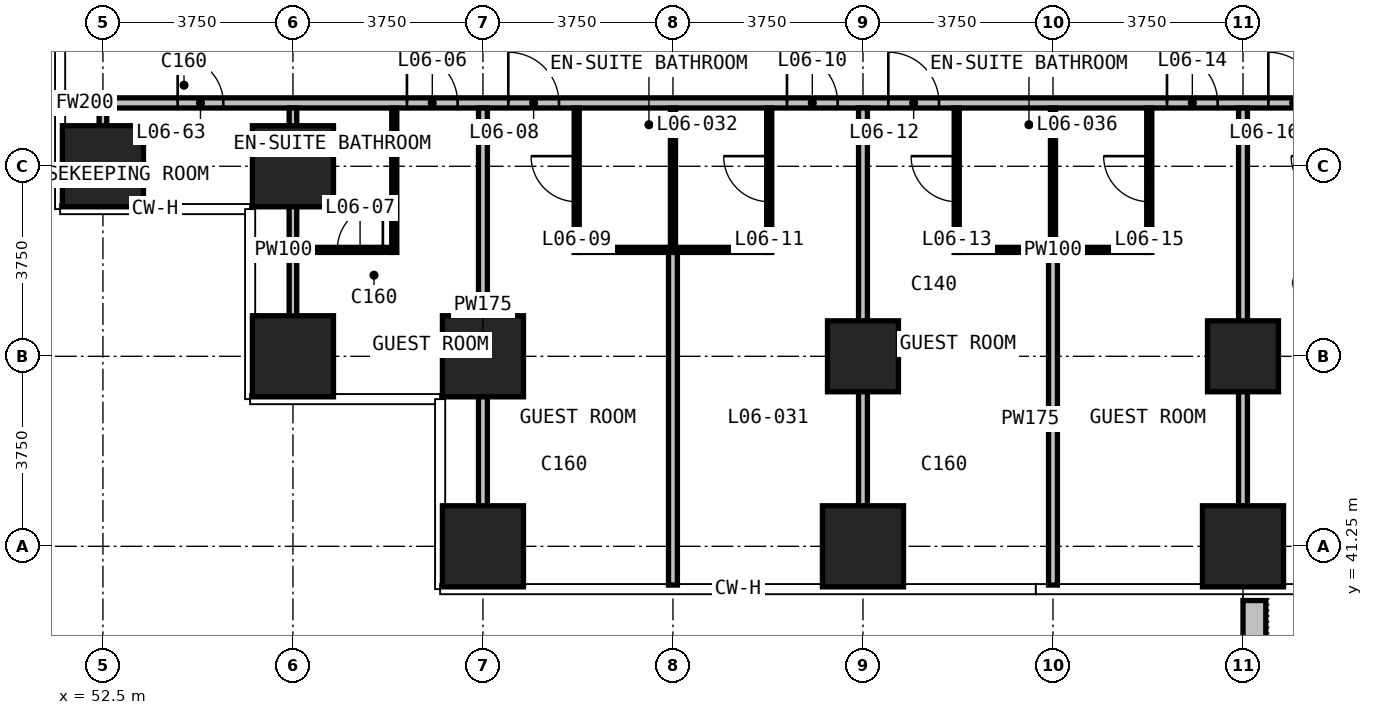
"""IFC4 building model, lengths in metres.
Left out: names, types, materials, properties, quantities, classifications, styles, units other than length and angle.
Written with IfcOpenShell. Run it as: python <this file> out.ifc"""

import sys

from ifc_helpers import new_model, si_unit, direction, frame, frame_2d, origin, origin_2d, place, context, subcontext, project, spatial, rectangle, extrude, element, fill, save


model = new_model("IFC4")
c1 = context("Model", 3, precision=1e-05, world=origin(), true_north=direction((0.0, 1.0)))
c2 = subcontext(c1, "Body", "Model", "MODEL_VIEW")
j1 = project(units=[si_unit("LENGTHUNIT", "METRE"), si_unit("PLANEANGLEUNIT", "RADIAN")], contexts=[c1])
p1 = place(None, origin())
s1 = spatial("IfcSite", under=j1, at=p1, CompositionType="ELEMENT")
p2 = place(p1, origin())
s2 = spatial("IfcBuilding", under=s1, at=p2, CompositionType="ELEMENT")
p3 = place(p2, frame((0.0, 0.0, 39.5)))
s3 = spatial("IfcBuildingStorey", under=s2, at=p3, CompositionType="ELEMENT", Elevation=39.5)
for number, where, z_axis, x_axis in (
    (1, (52.5, 48.75, 0.0), (0.0, 0.0, 1.0), (1.0, 0.0, 0.0)),
    (2, (56.25, 45.0, 0.0), (0.0, 0.0, 1.0), (1.0, 0.0, 0.0)),
    (3, (56.25, 48.75, 0.0), (0.0, 0.0, 1.0), (1.0, 0.0, 0.0)),
    (4, (60.0, 41.25, 0.0), (0.0, 0.0, 1.0), (1.0, 0.0, 0.0)),
    (5, (60.0, 45.0, 0.0), (0.0, 0.0, 1.0), (1.0, 0.0, 0.0)),
    (6, (67.5, 41.25, 0.0), (0.0, 0.0, 1.0), (1.0, 0.0, 0.0)),
):
    element("IfcColumn", number, at=place(p3, frame(where, z_axis=z_axis, x_axis=x_axis)), inside=s3, PredefinedType="COLUMN", context=c2, shape_type="SweptSolid", body=[
        extrude(rectangle(XDim=1.6, YDim=1.6, at=origin_2d()), origin(), (0.0, 0.0, 1.0), 3.3),
    ])
p4 = place(p3, frame((67.5, 45.0, 0.0), z_axis=(0.0, 0.0, 1.0), x_axis=(1.0, 0.0, 0.0)))
e7 = element("IfcColumn", 7, at=p4, inside=s3, PredefinedType="COLUMN", context=c2, shape_type="SweptSolid", body=[
    extrude(rectangle(XDim=1.4, YDim=1.4, at=origin_2d()), origin(), (0.0, 0.0, 1.0), 3.3),
])
p5 = place(p3, frame((75.0, 41.25, 0.0), z_axis=(0.0, 0.0, 1.0), x_axis=(1.0, 0.0, 0.0)))
e8 = element("IfcColumn", 8, at=p5, inside=s3, PredefinedType="COLUMN", context=c2, shape_type="SweptSolid", body=[
    extrude(rectangle(XDim=1.6, YDim=1.6, at=origin_2d()), origin(), (0.0, 0.0, 1.0), 3.3),
])
p6 = place(p3, frame((75.0, 45.0, 0.0), z_axis=(0.0, 0.0, 1.0), x_axis=(1.0, 0.0, 0.0)))
e9 = element("IfcColumn", 9, at=p6, inside=s3, PredefinedType="COLUMN", context=c2, shape_type="SweptSolid", body=[
    extrude(rectangle(XDim=1.4, YDim=1.4, at=origin_2d()), origin(), (0.0, 0.0, 1.0), 3.3),
])
p7 = place(p3, frame((75.225, 40.18, 0.0), z_axis=(0.0, 0.0, 1.0), x_axis=(0.0, -1.0, 0.0)))
e10 = element("IfcWall", 10, at=p7, inside=s3, PredefinedType="USERDEFINED", context=c2, shape_type="SweptSolid", body=[
    extrude(rectangle(XDim=2.33, YDim=0.45, at=frame_2d((1.165, 0.0))), origin(), (0.0, 0.0, 1.0), 1.1),
])
p8 = place(p3, frame((51.855, 50.0, 0.0), z_axis=(0.0, 0.0, 1.0), x_axis=(1.0, 0.0, 0.0)))
e11 = element("IfcWall", 11, at=p8, inside=s3, PredefinedType="PARTITIONING", context=c2, shape_type="SweptSolid", body=[
    extrude(rectangle(XDim=0.57, YDim=0.2, at=frame_2d((0.285, 0.0))), origin(), (0.0, 0.0, 1.0), 3.0),
])
p9 = place(p3, frame((52.575, 50.0, 0.0), z_axis=(0.0, 0.0, 1.0), x_axis=(1.0, 0.0, 0.0)))
e12 = element("IfcWall", 12, at=p9, inside=s3, PredefinedType="PARTITIONING", context=c2, shape_type="SweptSolid", body=[
    extrude(rectangle(XDim=44.85, YDim=0.2, at=frame_2d((22.425, 0.0))), origin(), (0.0, 0.0, 1.0), 3.0),
])
p10 = place(p9, frame((5.925, 0.0, 0.0)))
e13 = element("IfcOpeningElement", 13, at=p10, cuts=e12, PredefinedType="OPENING", context=c2, shape_type="SweptSolid", body=[
    extrude(rectangle(XDim=1.0, YDim=2.2, at=frame_2d((0.5, 1.1))), frame((0.0, 0.11, 0.0), z_axis=(0.0, -1.0, 0.0), x_axis=(1.0, 0.0, 0.0)), (0.0, 0.0, 1.0), 0.22),
])
p11 = place(p9, frame((7.925, 0.0, 0.0)))
e14 = element("IfcOpeningElement", 14, at=p11, cuts=e12, PredefinedType="OPENING", context=c2, shape_type="SweptSolid", body=[
    extrude(rectangle(XDim=1.0, YDim=2.2, at=frame_2d((0.5, 1.1))), frame((0.0, 0.11, 0.0), z_axis=(0.0, -1.0, 0.0), x_axis=(1.0, 0.0, 0.0)), (0.0, 0.0, 1.0), 0.22),
])
p12 = place(p9, frame((13.425, 0.0, 0.0)))
e15 = element("IfcOpeningElement", 15, at=p12, cuts=e12, PredefinedType="OPENING", context=c2, shape_type="SweptSolid", body=[
    extrude(rectangle(XDim=1.0, YDim=2.2, at=frame_2d((0.5, 1.1))), frame((0.0, 0.11, 0.0), z_axis=(0.0, -1.0, 0.0), x_axis=(1.0, 0.0, 0.0)), (0.0, 0.0, 1.0), 0.22),
])
p13 = place(p9, frame((15.425, 0.0, 0.0)))
e16 = element("IfcOpeningElement", 16, at=p13, cuts=e12, PredefinedType="OPENING", context=c2, shape_type="SweptSolid", body=[
    extrude(rectangle(XDim=1.0, YDim=2.2, at=frame_2d((0.5, 1.1))), frame((0.0, 0.11, 0.0), z_axis=(0.0, -1.0, 0.0), x_axis=(1.0, 0.0, 0.0)), (0.0, 0.0, 1.0), 0.22),
])
p14 = place(p9, frame((20.925, 0.0, 0.0)))
e17 = element("IfcOpeningElement", 17, at=p14, cuts=e12, PredefinedType="OPENING", context=c2, shape_type="SweptSolid", body=[
    extrude(rectangle(XDim=1.0, YDim=2.2, at=frame_2d((0.5, 1.1))), frame((0.0, 0.11, 0.0), z_axis=(0.0, -1.0, 0.0), x_axis=(1.0, 0.0, 0.0)), (0.0, 0.0, 1.0), 0.22),
])
p15 = place(p9, frame((22.925, 0.0, 0.0)))
e18 = element("IfcOpeningElement", 18, at=p15, cuts=e12, PredefinedType="OPENING", context=c2, shape_type="SweptSolid", body=[
    extrude(rectangle(XDim=1.0, YDim=2.2, at=frame_2d((0.5, 1.1))), frame((0.0, 0.11, 0.0), z_axis=(0.0, -1.0, 0.0), x_axis=(1.0, 0.0, 0.0)), (0.0, 0.0, 1.0), 0.22),
])
p16 = place(p9, frame((28.425, 0.0, 0.0)))
e19 = element("IfcOpeningElement", 19, at=p16, cuts=e12, PredefinedType="OPENING", context=c2, shape_type="SweptSolid", body=[
    extrude(rectangle(XDim=1.0, YDim=2.2, at=frame_2d((0.5, 1.1))), frame((0.0, 0.11, 0.0), z_axis=(0.0, -1.0, 0.0), x_axis=(1.0, 0.0, 0.0)), (0.0, 0.0, 1.0), 0.22),
])
p17 = place(p9, frame((30.425, 0.0, 0.0)))
e20 = element("IfcOpeningElement", 20, at=p17, cuts=e12, PredefinedType="OPENING", context=c2, shape_type="SweptSolid", body=[
    extrude(rectangle(XDim=1.0, YDim=2.2, at=frame_2d((0.5, 1.1))), frame((0.0, 0.11, 0.0), z_axis=(0.0, -1.0, 0.0), x_axis=(1.0, 0.0, 0.0)), (0.0, 0.0, 1.0), 0.22),
])
p18 = place(p9, frame((35.925, 0.0, 0.0)))
e21 = element("IfcOpeningElement", 21, at=p18, cuts=e12, PredefinedType="OPENING", context=c2, shape_type="SweptSolid", body=[
    extrude(rectangle(XDim=1.0, YDim=2.2, at=frame_2d((0.5, 1.1))), frame((0.0, 0.11, 0.0), z_axis=(0.0, -1.0, 0.0), x_axis=(1.0, 0.0, 0.0)), (0.0, 0.0, 1.0), 0.22),
])
p19 = place(p9, frame((37.925, 0.0, 0.0)))
e22 = element("IfcOpeningElement", 22, at=p19, cuts=e12, PredefinedType="OPENING", context=c2, shape_type="SweptSolid", body=[
    extrude(rectangle(XDim=1.0, YDim=2.2, at=frame_2d((0.5, 1.1))), frame((0.0, 0.11, 0.0), z_axis=(0.0, -1.0, 0.0), x_axis=(1.0, 0.0, 0.0)), (0.0, 0.0, 1.0), 0.22),
])
p20 = place(p9, frame((1.4, 0.0, 0.0)))
e23 = element("IfcOpeningElement", 23, at=p20, cuts=e12, PredefinedType="OPENING", context=c2, shape_type="SweptSolid", body=[
    extrude(rectangle(XDim=0.9, YDim=2.2, at=frame_2d((0.45, 1.1))), frame((0.0, 0.11, 0.0), z_axis=(0.0, -1.0, 0.0), x_axis=(1.0, 0.0, 0.0)), (0.0, 0.0, 1.0), 0.22),
])
p21 = place(p9, frame((42.575, 0.0, 0.0)))
e24 = element("IfcOpeningElement", 24, at=p21, cuts=e12, PredefinedType="OPENING", context=c2, shape_type="SweptSolid", body=[
    extrude(rectangle(XDim=0.9, YDim=2.2, at=frame_2d((0.45, 1.1))), frame((0.0, 0.11, 0.0), z_axis=(0.0, -1.0, 0.0), x_axis=(1.0, 0.0, 0.0)), (0.0, 0.0, 1.0), 0.22),
])
p22 = place(p3, frame((60.0, 40.485, 0.0), z_axis=(0.0, 0.0, 1.0), x_axis=(0.0, 1.0, 0.0)))
e25 = element("IfcWall", 25, at=p22, inside=s3, PredefinedType="PARTITIONING", context=c2, shape_type="SweptSolid", body=[
    extrude(rectangle(XDim=9.415, YDim=0.175, at=frame_2d((4.708, 0.0))), origin(), (0.0, 0.0, 1.0), 3.0),
])
p23 = place(p3, frame((63.75, 40.485, 0.0), z_axis=(0.0, 0.0, 1.0), x_axis=(0.0, 1.0, 0.0)))
e26 = element("IfcWall", 26, at=p23, inside=s3, PredefinedType="PARTITIONING", context=c2, shape_type="SweptSolid", body=[
    extrude(rectangle(XDim=6.565, YDim=0.175, at=frame_2d((3.282, 0.0))), origin(), (0.0, 0.0, 1.0), 3.0),
])
p24 = place(p3, frame((67.5, 40.485, 0.0), z_axis=(0.0, 0.0, 1.0), x_axis=(0.0, 1.0, 0.0)))
e27 = element("IfcWall", 27, at=p24, inside=s3, PredefinedType="PARTITIONING", context=c2, shape_type="SweptSolid", body=[
    extrude(rectangle(XDim=9.415, YDim=0.175, at=frame_2d((4.708, 0.0))), origin(), (0.0, 0.0, 1.0), 3.0),
])
p25 = place(p3, frame((71.25, 40.485, 0.0), z_axis=(0.0, 0.0, 1.0), x_axis=(0.0, 1.0, 0.0)))
e28 = element("IfcWall", 28, at=p25, inside=s3, PredefinedType="PARTITIONING", context=c2, shape_type="SweptSolid", body=[
    extrude(rectangle(XDim=6.565, YDim=0.175, at=frame_2d((3.282, 0.0))), origin(), (0.0, 0.0, 1.0), 3.0),
])
p26 = place(p3, frame((75.0, 40.485, 0.0), z_axis=(0.0, 0.0, 1.0), x_axis=(0.0, 1.0, 0.0)))
e29 = element("IfcWall", 29, at=p26, inside=s3, PredefinedType="PARTITIONING", context=c2, shape_type="SweptSolid", body=[
    extrude(rectangle(XDim=9.415, YDim=0.175, at=frame_2d((4.708, 0.0))), origin(), (0.0, 0.0, 1.0), 3.0),
])
p27 = place(p3, frame((52.5, 48.105, 0.0), z_axis=(0.0, 0.0, 1.0), x_axis=(0.0, 1.0, 0.0)))
e30 = element("IfcWall", 30, at=p27, inside=s3, PredefinedType="PARTITIONING", context=c2, shape_type="SweptSolid", body=[
    extrude(rectangle(XDim=1.995, YDim=0.15, at=frame_2d((0.998, 0.0))), origin(), (0.0, 0.0, 1.0), 3.0),
])
p28 = place(p3, frame((56.25, 44.235, 0.0), z_axis=(0.0, 0.0, 1.0), x_axis=(0.0, 1.0, 0.0)))
e31 = element("IfcWall", 31, at=p28, inside=s3, PredefinedType="PARTITIONING", context=c2, shape_type="SweptSolid", body=[
    extrude(rectangle(XDim=5.665, YDim=0.15, at=frame_2d((2.833, 0.0))), origin(), (0.0, 0.0, 1.0), 3.0),
])
p29 = place(p3, frame((56.325, 47.1, 0.0), z_axis=(0.0, 0.0, 1.0), x_axis=(1.0, 0.0, 0.0)))
e32 = element("IfcWall", 32, at=p29, inside=s3, PredefinedType="PARTITIONING", context=c2, shape_type="SweptSolid", body=[
    extrude(rectangle(XDim=1.875, YDim=0.1, at=frame_2d((0.938, 0.0))), origin(), (0.0, 0.0, 1.0), 3.0),
])
p30 = place(p29, frame((0.8, 0.0, 0.0)))
e33 = element("IfcOpeningElement", 33, at=p30, cuts=e32, PredefinedType="OPENING", context=c2, shape_type="SweptSolid", body=[
    extrude(rectangle(XDim=0.9, YDim=2.2, at=frame_2d((0.45, 1.1))), frame((0.0, 0.06, 0.0), z_axis=(0.0, -1.0, 0.0), x_axis=(1.0, 0.0, 0.0)), (0.0, 0.0, 1.0), 0.12),
])
for number, where, z_axis, x_axis in (
    (34, (61.9, 47.1, 0.0), (0.0, 0.0, 1.0), (1.0, 0.0, 0.0)),
    (35, (69.4, 47.1, 0.0), (0.0, 0.0, 1.0), (1.0, 0.0, 0.0)),
):
    element("IfcWall", number, at=place(p3, frame(where, z_axis=z_axis, x_axis=x_axis)), inside=s3, PredefinedType="PARTITIONING", context=c2, shape_type="SweptSolid", body=[
        extrude(rectangle(XDim=3.7, YDim=0.1, at=frame_2d((1.85, 0.0))), origin(), (0.0, 0.0, 1.0), 3.0),
    ])
p31 = place(p3, frame((58.25, 47.05, 0.0), z_axis=(0.0, 0.0, 1.0), x_axis=(0.0, 1.0, 0.0)))
e36 = element("IfcWall", 36, at=p31, inside=s3, PredefinedType="PARTITIONING", context=c2, shape_type="SweptSolid", body=[
    extrude(rectangle(XDim=2.85, YDim=0.1, at=frame_2d((1.425, 0.0))), origin(), (0.0, 0.0, 1.0), 3.0),
])
p32 = place(p3, frame((61.85, 47.05, 0.0), z_axis=(0.0, 0.0, 1.0), x_axis=(0.0, 1.0, 0.0)))
e37 = element("IfcWall", 37, at=p32, inside=s3, PredefinedType="PARTITIONING", context=c2, shape_type="SweptSolid", body=[
    extrude(rectangle(XDim=2.85, YDim=0.1, at=frame_2d((1.425, 0.0))), origin(), (0.0, 0.0, 1.0), 3.0),
])
p33 = place(p32, frame((1.0, 0.0, 0.0)))
e38 = element("IfcOpeningElement", 38, at=p33, cuts=e37, PredefinedType="OPENING", context=c2, shape_type="SweptSolid", body=[
    extrude(rectangle(XDim=0.9, YDim=2.2, at=frame_2d((0.45, 1.1))), frame((0.0, 0.06, 0.0), z_axis=(0.0, -1.0, 0.0), x_axis=(1.0, 0.0, 0.0)), (0.0, 0.0, 1.0), 0.12),
])
p34 = place(p3, frame((63.75, 47.15, 0.0), z_axis=(0.0, 0.0, 1.0), x_axis=(0.0, 1.0, 0.0)))
e39 = element("IfcWall", 39, at=p34, inside=s3, PredefinedType="PARTITIONING", context=c2, shape_type="SweptSolid", body=[
    extrude(rectangle(XDim=2.75, YDim=0.1, at=frame_2d((1.375, 0.0))), origin(), (0.0, 0.0, 1.0), 3.0),
])
p35 = place(p3, frame((65.65, 47.05, 0.0), z_axis=(0.0, 0.0, 1.0), x_axis=(0.0, 1.0, 0.0)))
e40 = element("IfcWall", 40, at=p35, inside=s3, PredefinedType="PARTITIONING", context=c2, shape_type="SweptSolid", body=[
    extrude(rectangle(XDim=2.85, YDim=0.1, at=frame_2d((1.425, 0.0))), origin(), (0.0, 0.0, 1.0), 3.0),
])
p36 = place(p35, frame((1.0, 0.0, 0.0)))
e41 = element("IfcOpeningElement", 41, at=p36, cuts=e40, PredefinedType="OPENING", context=c2, shape_type="SweptSolid", body=[
    extrude(rectangle(XDim=0.9, YDim=2.2, at=frame_2d((0.45, 1.1))), frame((0.0, 0.06, 0.0), z_axis=(0.0, -1.0, 0.0), x_axis=(1.0, 0.0, 0.0)), (0.0, 0.0, 1.0), 0.12),
])
p37 = place(p3, frame((69.35, 47.05, 0.0), z_axis=(0.0, 0.0, 1.0), x_axis=(0.0, 1.0, 0.0)))
e42 = element("IfcWall", 42, at=p37, inside=s3, PredefinedType="PARTITIONING", context=c2, shape_type="SweptSolid", body=[
    extrude(rectangle(XDim=2.85, YDim=0.1, at=frame_2d((1.425, 0.0))), origin(), (0.0, 0.0, 1.0), 3.0),
])
p38 = place(p37, frame((1.0, 0.0, 0.0)))
e43 = element("IfcOpeningElement", 43, at=p38, cuts=e42, PredefinedType="OPENING", context=c2, shape_type="SweptSolid", body=[
    extrude(rectangle(XDim=0.9, YDim=2.2, at=frame_2d((0.45, 1.1))), frame((0.0, 0.06, 0.0), z_axis=(0.0, -1.0, 0.0), x_axis=(1.0, 0.0, 0.0)), (0.0, 0.0, 1.0), 0.12),
])
p39 = place(p3, frame((71.25, 47.15, 0.0), z_axis=(0.0, 0.0, 1.0), x_axis=(0.0, 1.0, 0.0)))
e44 = element("IfcWall", 44, at=p39, inside=s3, PredefinedType="PARTITIONING", context=c2, shape_type="SweptSolid", body=[
    extrude(rectangle(XDim=2.75, YDim=0.1, at=frame_2d((1.375, 0.0))), origin(), (0.0, 0.0, 1.0), 3.0),
])
p40 = place(p3, frame((73.15, 47.05, 0.0), z_axis=(0.0, 0.0, 1.0), x_axis=(0.0, 1.0, 0.0)))
e45 = element("IfcWall", 45, at=p40, inside=s3, PredefinedType="PARTITIONING", context=c2, shape_type="SweptSolid", body=[
    extrude(rectangle(XDim=2.85, YDim=0.1, at=frame_2d((1.425, 0.0))), origin(), (0.0, 0.0, 1.0), 3.0),
])
p41 = place(p40, frame((1.0, 0.0, 0.0)))
e46 = element("IfcOpeningElement", 46, at=p41, cuts=e45, PredefinedType="OPENING", context=c2, shape_type="SweptSolid", body=[
    extrude(rectangle(XDim=0.9, YDim=2.2, at=frame_2d((0.45, 1.1))), frame((0.0, 0.06, 0.0), z_axis=(0.0, -1.0, 0.0), x_axis=(1.0, 0.0, 0.0)), (0.0, 0.0, 1.0), 0.12),
])
p42 = place(p10, origin())
e47 = element("IfcDoor", 47, at=p42, inside=s3, OperationType="SINGLE_SWING_RIGHT", PredefinedType="DOOR", context=c2, shape_type="SweptSolid", body=[
    extrude(rectangle(XDim=1.0, YDim=2.2, at=frame_2d((0.5, 1.1))), frame((0.0, 0.025, 0.0), z_axis=(0.0, -1.0, 0.0), x_axis=(1.0, 0.0, 0.0)), (0.0, 0.0, 1.0), 0.05),
])
fill(e13, e47)
p43 = place(p30, origin())
e48 = element("IfcDoor", 48, at=p43, inside=s3, OperationType="SINGLE_SWING_RIGHT", PredefinedType="DOOR", context=c2, shape_type="SweptSolid", body=[
    extrude(rectangle(XDim=0.9, YDim=2.2, at=frame_2d((0.45, 1.1))), frame((0.0, 0.025, 0.0), z_axis=(0.0, -1.0, 0.0), x_axis=(1.0, 0.0, 0.0)), (0.0, 0.0, 1.0), 0.05),
])
fill(e33, e48)
p44 = place(p11, origin())
e49 = element("IfcDoor", 49, at=p44, inside=s3, OperationType="SINGLE_SWING_RIGHT", PredefinedType="DOOR", context=c2, shape_type="SweptSolid", body=[
    extrude(rectangle(XDim=1.0, YDim=2.2, at=frame_2d((0.5, 1.1))), frame((0.0, 0.025, 0.0), z_axis=(0.0, -1.0, 0.0), x_axis=(1.0, 0.0, 0.0)), (0.0, 0.0, 1.0), 0.05),
])
fill(e14, e49)
p45 = place(p33, origin())
e50 = element("IfcDoor", 50, at=p45, inside=s3, OperationType="SINGLE_SWING_RIGHT", PredefinedType="DOOR", context=c2, shape_type="SweptSolid", body=[
    extrude(rectangle(XDim=0.9, YDim=2.2, at=frame_2d((0.45, 1.1))), frame((0.0, 0.025, 0.0), z_axis=(0.0, -1.0, 0.0), x_axis=(1.0, 0.0, 0.0)), (0.0, 0.0, 1.0), 0.05),
])
fill(e38, e50)
p46 = place(p12, origin())
e51 = element("IfcDoor", 51, at=p46, inside=s3, OperationType="SINGLE_SWING_LEFT", PredefinedType="DOOR", context=c2, shape_type="SweptSolid", body=[
    extrude(rectangle(XDim=1.0, YDim=2.2, at=frame_2d((0.5, 1.1))), frame((0.0, 0.025, 0.0), z_axis=(0.0, -1.0, 0.0), x_axis=(1.0, 0.0, 0.0)), (0.0, 0.0, 1.0), 0.05),
])
fill(e15, e51)
p47 = place(p36, origin())
e52 = element("IfcDoor", 52, at=p47, inside=s3, OperationType="SINGLE_SWING_RIGHT", PredefinedType="DOOR", context=c2, shape_type="SweptSolid", body=[
    extrude(rectangle(XDim=0.9, YDim=2.2, at=frame_2d((0.45, 1.1))), frame((0.0, 0.025, 0.0), z_axis=(0.0, -1.0, 0.0), x_axis=(1.0, 0.0, 0.0)), (0.0, 0.0, 1.0), 0.05),
])
fill(e41, e52)
p48 = place(p13, origin())
e53 = element("IfcDoor", 53, at=p48, inside=s3, OperationType="SINGLE_SWING_LEFT", PredefinedType="DOOR", context=c2, shape_type="SweptSolid", body=[
    extrude(rectangle(XDim=1.0, YDim=2.2, at=frame_2d((0.5, 1.1))), frame((0.0, 0.025, 0.0), z_axis=(0.0, -1.0, 0.0), x_axis=(1.0, 0.0, 0.0)), (0.0, 0.0, 1.0), 0.05),
])
fill(e16, e53)
p49 = place(p38, origin())
e54 = element("IfcDoor", 54, at=p49, inside=s3, OperationType="SINGLE_SWING_RIGHT", PredefinedType="DOOR", context=c2, shape_type="SweptSolid", body=[
    extrude(rectangle(XDim=0.9, YDim=2.2, at=frame_2d((0.45, 1.1))), frame((0.0, 0.025, 0.0), z_axis=(0.0, -1.0, 0.0), x_axis=(1.0, 0.0, 0.0)), (0.0, 0.0, 1.0), 0.05),
])
fill(e43, e54)
p50 = place(p14, origin())
e55 = element("IfcDoor", 55, at=p50, inside=s3, OperationType="SINGLE_SWING_LEFT", PredefinedType="DOOR", context=c2, shape_type="SweptSolid", body=[
    extrude(rectangle(XDim=1.0, YDim=2.2, at=frame_2d((0.5, 1.1))), frame((0.0, 0.025, 0.0), z_axis=(0.0, -1.0, 0.0), x_axis=(1.0, 0.0, 0.0)), (0.0, 0.0, 1.0), 0.05),
])
fill(e17, e55)
p51 = place(p41, origin())
e56 = element("IfcDoor", 56, at=p51, inside=s3, OperationType="SINGLE_SWING_RIGHT", PredefinedType="DOOR", context=c2, shape_type="SweptSolid", body=[
    extrude(rectangle(XDim=0.9, YDim=2.2, at=frame_2d((0.45, 1.1))), frame((0.0, 0.025, 0.0), z_axis=(0.0, -1.0, 0.0), x_axis=(1.0, 0.0, 0.0)), (0.0, 0.0, 1.0), 0.05),
])
fill(e46, e56)
p52 = place(p15, origin())
e57 = element("IfcDoor", 57, at=p52, inside=s3, OperationType="SINGLE_SWING_RIGHT", PredefinedType="DOOR", context=c2, shape_type="SweptSolid", body=[
    extrude(rectangle(XDim=1.0, YDim=2.2, at=frame_2d((0.5, 1.1))), frame((0.0, 0.025, 0.0), z_axis=(0.0, -1.0, 0.0), x_axis=(1.0, 0.0, 0.0)), (0.0, 0.0, 1.0), 0.05),
])
fill(e18, e57)
p53 = place(p20, origin())
e58 = element("IfcDoor", 58, at=p53, inside=s3, OperationType="SINGLE_SWING_LEFT", PredefinedType="DOOR", context=c2, shape_type="SweptSolid", body=[
    extrude(rectangle(XDim=0.9, YDim=2.2, at=frame_2d((0.45, 1.1))), frame((0.0, 0.025, 0.0), z_axis=(0.0, -1.0, 0.0), x_axis=(1.0, 0.0, 0.0)), (0.0, 0.0, 1.0), 0.05),
])
fill(e23, e58)
save(model, sys.argv[1])
